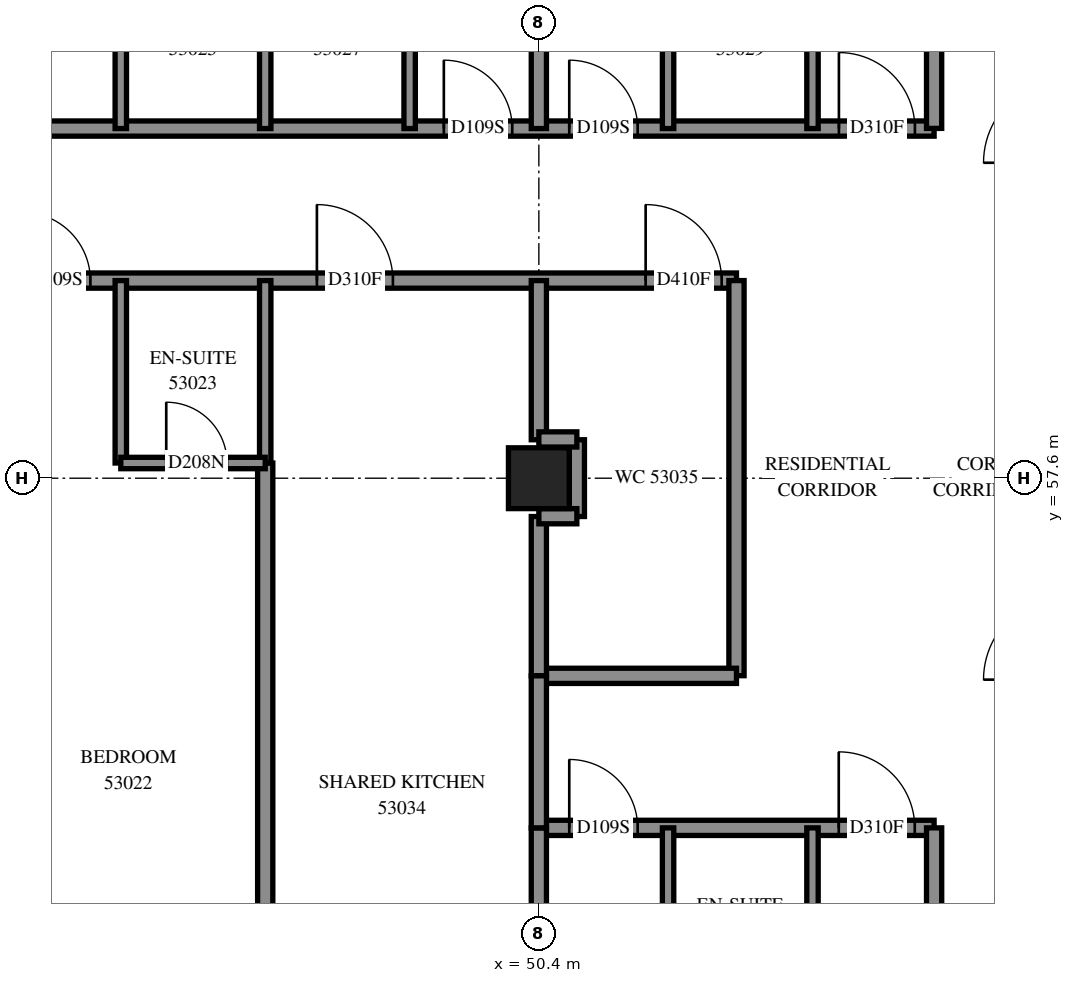
"""IFC4 building model, lengths in metres.
Left out: names, types, materials, properties, quantities, classifications, styles, units other than length and angle.
Written with IfcOpenShell. Run it as: python <this file> out.ifc"""

import sys

from ifc_helpers import new_model, si_unit, direction, frame, frame_2d, origin, origin_2d, place, context, subcontext, project, spatial, rectangle, extrude, element, fill, save


model = new_model("IFC4")
c1 = context("Model", 3, precision=1e-05, world=origin(), true_north=direction((0.0, 1.0)))
c2 = subcontext(c1, "Body", "Model", "MODEL_VIEW")
j1 = project(units=[si_unit("LENGTHUNIT", "METRE"), si_unit("PLANEANGLEUNIT", "RADIAN")], contexts=[c1])
p1 = place(None, origin())
s1 = spatial("IfcSite", under=j1, at=p1, CompositionType="ELEMENT")
p2 = place(p1, origin())
s2 = spatial("IfcBuilding", under=s1, at=p2, CompositionType="ELEMENT")
p3 = place(p2, frame((0.0, 0.0, 196.4)))
s3 = spatial("IfcBuildingStorey", under=s2, at=p3, CompositionType="ELEMENT", Elevation=196.4)
p4 = place(p3, frame((50.4, 57.6, 0.0), z_axis=(0.0, 0.0, 1.0), x_axis=(1.0, 0.0, 0.0)))
e1 = element("IfcColumn", 1, at=p4, inside=s3, PredefinedType="COLUMN", context=c2, shape_type="SweptSolid", body=[
    extrude(rectangle(XDim=0.8, YDim=0.8, at=origin_2d()), origin(), (0.0, 0.0, 1.0), 3.1),
])
p5 = place(p3, frame((36.0, 60.2, 0.0), z_axis=(0.0, 0.0, 1.0), x_axis=(1.0, 0.0, 0.0)))
e2 = element("IfcWall", 2, at=p5, inside=s3, PredefinedType="PARTITIONING", context=c2, shape_type="SweptSolid", body=[
    extrude(rectangle(XDim=17.0, YDim=0.2, at=frame_2d((8.5, 0.0))), origin(), (0.0, 0.0, 1.0), 3.1),
])
p6 = place(p5, frame((4.125, 0.0, 0.0)))
e3 = element("IfcOpeningElement", 3, at=p6, cuts=e2, PredefinedType="OPENING", context=c2, shape_type="SweptSolid", body=[
    extrude(rectangle(XDim=1.0, YDim=2.1, at=frame_2d((0.5, 1.05))), frame((0.0, 0.11, 0.0), z_axis=(0.0, -1.0, 0.0), x_axis=(1.0, 0.0, 0.0)), (0.0, 0.0, 1.0), 0.22),
])
p7 = place(p5, frame((7.6, 0.0, 0.0)))
e4 = element("IfcOpeningElement", 4, at=p7, cuts=e2, PredefinedType="OPENING", context=c2, shape_type="SweptSolid", body=[
    extrude(rectangle(XDim=0.9, YDim=2.1, at=frame_2d((0.45, 1.05))), frame((0.0, 0.11, 0.0), z_axis=(0.0, -1.0, 0.0), x_axis=(1.0, 0.0, 0.0)), (0.0, 0.0, 1.0), 0.22),
])
p8 = place(p5, frame((11.48, 0.0, 0.0)))
e5 = element("IfcOpeningElement", 5, at=p8, cuts=e2, PredefinedType="OPENING", context=c2, shape_type="SweptSolid", body=[
    extrude(rectangle(XDim=1.0, YDim=2.1, at=frame_2d((0.5, 1.05))), frame((0.0, 0.11, 0.0), z_axis=(0.0, -1.0, 0.0), x_axis=(1.0, 0.0, 0.0)), (0.0, 0.0, 1.0), 0.22),
])
p9 = place(p5, frame((15.805, 0.0, 0.0)))
e6 = element("IfcOpeningElement", 6, at=p9, cuts=e2, PredefinedType="OPENING", context=c2, shape_type="SweptSolid", body=[
    extrude(rectangle(XDim=1.0, YDim=2.1, at=frame_2d((0.5, 1.05))), frame((0.0, 0.11, 0.0), z_axis=(0.0, -1.0, 0.0), x_axis=(1.0, 0.0, 0.0)), (0.0, 0.0, 1.0), 0.22),
])
p10 = place(p3, frame((40.602, 62.2, 0.0), z_axis=(0.0, 0.0, 1.0), x_axis=(1.0, 0.0, 0.0)))
e7 = element("IfcWall", 7, at=p10, inside=s3, PredefinedType="PARTITIONING", context=c2, shape_type="SweptSolid", body=[
    extrude(rectangle(XDim=14.998, YDim=0.2, at=frame_2d((7.499, 0.0))), origin(), (0.0, 0.0, 1.0), 3.1),
])
p11 = place(p10, frame((1.306, 0.0, 0.0)))
e8 = element("IfcOpeningElement", 8, at=p11, cuts=e7, PredefinedType="OPENING", context=c2, shape_type="SweptSolid", body=[
    extrude(rectangle(XDim=0.9, YDim=2.1, at=frame_2d((0.45, 1.05))), frame((0.0, 0.11, 0.0), z_axis=(0.0, -1.0, 0.0), x_axis=(1.0, 0.0, 0.0)), (0.0, 0.0, 1.0), 0.22),
])
p12 = place(p10, frame((8.548, 0.0, 0.0)))
e9 = element("IfcOpeningElement", 9, at=p12, cuts=e7, PredefinedType="OPENING", context=c2, shape_type="SweptSolid", body=[
    extrude(rectangle(XDim=0.9, YDim=2.1, at=frame_2d((0.45, 1.05))), frame((0.0, 0.11, 0.0), z_axis=(0.0, -1.0, 0.0), x_axis=(1.0, 0.0, 0.0)), (0.0, 0.0, 1.0), 0.22),
])
p13 = place(p10, frame((10.198, 0.0, 0.0)))
e10 = element("IfcOpeningElement", 10, at=p13, cuts=e7, PredefinedType="OPENING", context=c2, shape_type="SweptSolid", body=[
    extrude(rectangle(XDim=0.9, YDim=2.1, at=frame_2d((0.45, 1.05))), frame((0.0, 0.11, 0.0), z_axis=(0.0, -1.0, 0.0), x_axis=(1.0, 0.0, 0.0)), (0.0, 0.0, 1.0), 0.22),
])
p14 = place(p10, frame((13.746, 0.0, 0.0)))
e11 = element("IfcOpeningElement", 11, at=p14, cuts=e7, PredefinedType="OPENING", context=c2, shape_type="SweptSolid", body=[
    extrude(rectangle(XDim=1.0, YDim=2.1, at=frame_2d((0.5, 1.05))), frame((0.0, 0.11, 0.0), z_axis=(0.0, -1.0, 0.0), x_axis=(1.0, 0.0, 0.0)), (0.0, 0.0, 1.0), 0.22),
])
p15 = place(p3, frame((46.8, 49.7, 0.0), z_axis=(0.0, 0.0, 1.0), x_axis=(0.0, 1.0, 0.0)))
e12 = element("IfcWall", 12, at=p15, inside=s3, PredefinedType="PARTITIONING", context=c2, shape_type="SweptSolid", body=[
    extrude(rectangle(XDim=8.1, YDim=0.2, at=frame_2d((4.05, 0.0))), origin(), (0.0, 0.0, 1.0), 3.1),
])
p16 = place(p3, frame((50.4, 53.0, 0.0), z_axis=(0.0, 0.0, 1.0), x_axis=(1.0, 0.0, 0.0)))
e13 = element("IfcWall", 13, at=p16, inside=s3, PredefinedType="PARTITIONING", context=c2, shape_type="SweptSolid", body=[
    extrude(rectangle(XDim=5.2, YDim=0.2, at=frame_2d((2.6, 0.0))), origin(), (0.0, 0.0, 1.0), 3.1),
])
p17 = place(p16, frame((0.4, 0.0, 0.0)))
e14 = element("IfcOpeningElement", 14, at=p17, cuts=e13, PredefinedType="OPENING", context=c2, shape_type="SweptSolid", body=[
    extrude(rectangle(XDim=0.9, YDim=2.1, at=frame_2d((0.45, 1.05))), frame((0.0, 0.11, 0.0), z_axis=(0.0, -1.0, 0.0), x_axis=(1.0, 0.0, 0.0)), (0.0, 0.0, 1.0), 0.22),
])
p18 = place(p16, frame((3.946, 0.0, 0.0)))
e15 = element("IfcOpeningElement", 15, at=p18, cuts=e13, PredefinedType="OPENING", context=c2, shape_type="SweptSolid", body=[
    extrude(rectangle(XDim=1.0, YDim=2.1, at=frame_2d((0.5, 1.05))), frame((0.0, 0.11, 0.0), z_axis=(0.0, -1.0, 0.0), x_axis=(1.0, 0.0, 0.0)), (0.0, 0.0, 1.0), 0.22),
])
p19 = place(p3, frame((53.0, 55.002, 0.0), z_axis=(0.0, 0.0, 1.0), x_axis=(0.0, 1.0, 0.0)))
e16 = element("IfcWall", 16, at=p19, inside=s3, PredefinedType="PARTITIONING", context=c2, shape_type="SweptSolid", body=[
    extrude(rectangle(XDim=5.198, YDim=0.2, at=frame_2d((2.599, 0.0))), origin(), (0.0, 0.0, 1.0), 3.1),
])
p20 = place(p3, frame((55.6, 48.4, 0.0), z_axis=(0.0, 0.0, 1.0), x_axis=(0.0, 1.0, 0.0)))
e17 = element("IfcWall", 17, at=p20, inside=s3, PredefinedType="PARTITIONING", context=c2, shape_type="SweptSolid", body=[
    extrude(rectangle(XDim=4.6, YDim=0.2, at=frame_2d((2.3, 0.0))), origin(), (0.0, 0.0, 1.0), 3.1),
])
p21 = place(p3, frame((55.6, 62.202, 0.0), z_axis=(0.0, 0.0, 1.0), x_axis=(0.0, 1.0, 0.0)))
e18 = element("IfcWall", 18, at=p21, inside=s3, PredefinedType="PARTITIONING", context=c2, shape_type="SweptSolid", body=[
    extrude(rectangle(XDim=4.598, YDim=0.2, at=frame_2d((2.299, 0.0))), origin(), (0.0, 0.0, 1.0), 3.1),
])
p22 = place(p3, frame((50.4, 55.0, 0.0), z_axis=(0.0, 0.0, 1.0), x_axis=(1.0, 0.0, 0.0)))
e19 = element("IfcWall", 19, at=p22, inside=s3, PredefinedType="PARTITIONING", context=c2, shape_type="SweptSolid", body=[
    extrude(rectangle(XDim=2.6, YDim=0.2, at=frame_2d((1.3, 0.0))), origin(), (0.0, 0.0, 1.0), 3.1),
])
for number, where, z_axis, x_axis in (
    (20, (44.9, 57.8, 0.0), (0.0, 0.0, 1.0), (0.0, 1.0, 0.0)),
    (21, (46.8, 57.8, 0.0), (0.0, 0.0, 1.0), (0.0, 1.0, 0.0)),
    (22, (52.1, 50.6, 0.0), (0.0, 0.0, 1.0), (0.0, 1.0, 0.0)),
    (23, (54.0, 50.6, 0.0), (0.0, 0.0, 1.0), (0.0, 1.0, 0.0)),
    (24, (44.9, 62.2, 0.0), (0.0, 0.0, 1.0), (0.0, 1.0, 0.0)),
    (25, (46.8, 62.2, 0.0), (0.0, 0.0, 1.0), (0.0, 1.0, 0.0)),
    (26, (48.7, 62.2, 0.0), (0.0, 0.0, 1.0), (0.0, 1.0, 0.0)),
    (27, (52.1, 62.2, 0.0), (0.0, 0.0, 1.0), (0.0, 1.0, 0.0)),
    (28, (54.0, 62.2, 0.0), (0.0, 0.0, 1.0), (0.0, 1.0, 0.0)),
):
    element("IfcWall", number, at=place(p3, frame(where, z_axis=z_axis, x_axis=x_axis)), inside=s3, PredefinedType="PARTITIONING", context=c2, shape_type="SweptSolid", body=[
        extrude(rectangle(XDim=2.4, YDim=0.15, at=frame_2d((1.2, 0.0))), origin(), (0.0, 0.0, 1.0), 3.1),
    ])
for number, where, z_axis, x_axis in (
    (29, (50.4, 50.8, 0.0), (0.0, 0.0, 1.0), (0.0, 1.0, 0.0)),
    (30, (50.4, 62.2, 0.0), (0.0, 0.0, 1.0), (0.0, 1.0, 0.0)),
):
    element("IfcWall", number, at=place(p3, frame(where, z_axis=z_axis, x_axis=x_axis)), inside=s3, PredefinedType="PARTITIONING", context=c2, shape_type="SweptSolid", body=[
        extrude(rectangle(XDim=2.2, YDim=0.2, at=frame_2d((1.1, 0.0))), origin(), (0.0, 0.0, 1.0), 3.1),
    ])
p23 = place(p3, frame((50.4, 55.0, 0.0), z_axis=(0.0, 0.0, 1.0), x_axis=(0.0, 1.0, 0.0)))
e31 = element("IfcWall", 31, at=p23, inside=s3, PredefinedType="PARTITIONING", context=c2, shape_type="SweptSolid", body=[
    extrude(rectangle(XDim=2.096, YDim=0.2, at=frame_2d((1.048, 0.0))), origin(), (0.0, 0.0, 1.0), 3.1),
])
p24 = place(p3, frame((50.4, 58.106, 0.0), z_axis=(0.0, 0.0, 1.0), x_axis=(0.0, 1.0, 0.0)))
e32 = element("IfcWall", 32, at=p24, inside=s3, PredefinedType="PARTITIONING", context=c2, shape_type="SweptSolid", body=[
    extrude(rectangle(XDim=2.094, YDim=0.2, at=frame_2d((1.047, 0.0))), origin(), (0.0, 0.0, 1.0), 3.1),
])
p25 = place(p3, frame((50.4, 53.0, 0.0), z_axis=(0.0, 0.0, 1.0), x_axis=(0.0, 1.0, 0.0)))
e33 = element("IfcWall", 33, at=p25, inside=s3, PredefinedType="PARTITIONING", context=c2, shape_type="SweptSolid", body=[
    extrude(rectangle(XDim=2.0, YDim=0.2, at=frame_2d((1.0, 0.0))), origin(), (0.0, 0.0, 1.0), 3.1),
])
p26 = place(p3, frame((44.9, 57.8, 0.0), z_axis=(0.0, 0.0, 1.0), x_axis=(1.0, 0.0, 0.0)))
e34 = element("IfcWall", 34, at=p26, inside=s3, PredefinedType="PARTITIONING", context=c2, shape_type="SweptSolid", body=[
    extrude(rectangle(XDim=1.9, YDim=0.15, at=frame_2d((0.95, 0.0))), origin(), (0.0, 0.0, 1.0), 3.1),
])
p27 = place(p26, frame((0.598, 0.0, 0.0)))
e35 = element("IfcOpeningElement", 35, at=p27, cuts=e34, PredefinedType="OPENING", context=c2, shape_type="SweptSolid", body=[
    extrude(rectangle(XDim=0.8, YDim=2.1, at=frame_2d((0.4, 1.05))), frame((0.0, 0.085, 0.0), z_axis=(0.0, -1.0, 0.0), x_axis=(1.0, 0.0, 0.0)), (0.0, 0.0, 1.0), 0.17),
])
p28 = place(p3, frame((50.9, 57.096, 0.0), z_axis=(0.0, 0.0, 1.0), x_axis=(0.0, 1.0, 0.0)))
e36 = element("IfcWall", 36, at=p28, inside=s3, PredefinedType="PARTITIONING", context=c2, shape_type="SweptSolid", body=[
    extrude(rectangle(XDim=1.01, YDim=0.2, at=frame_2d((0.505, 0.0))), origin(), (0.0, 0.0, 1.0), 3.1),
])
for number, where, z_axis, x_axis in (
    (37, (50.4, 58.11, 0.0), (0.0, 0.0, 1.0), (1.0, 0.0, 0.0)),
    (38, (50.4, 57.1, 0.0), (0.0, 0.0, 1.0), (1.0, 0.0, 0.0)),
):
    element("IfcWall", number, at=place(p3, frame(where, z_axis=z_axis, x_axis=x_axis)), inside=s3, PredefinedType="PARTITIONING", context=c2, shape_type="SweptSolid", body=[
        extrude(rectangle(XDim=0.5, YDim=0.2, at=frame_2d((0.25, 0.0))), origin(), (0.0, 0.0, 1.0), 3.1),
    ])
p29 = place(p7, origin())
e39 = element("IfcDoor", 39, at=p29, inside=s3, OperationType="SINGLE_SWING_LEFT", PredefinedType="DOOR", context=c2, shape_type="SweptSolid", body=[
    extrude(rectangle(XDim=0.9, YDim=2.1, at=frame_2d((0.45, 1.05))), frame((0.0, 0.025, 0.0), z_axis=(0.0, -1.0, 0.0), x_axis=(1.0, 0.0, 0.0)), (0.0, 0.0, 1.0), 0.05),
])
fill(e4, e39)
p30 = place(p27, origin())
e40 = element("IfcDoor", 40, at=p30, inside=s3, OperationType="SINGLE_SWING_RIGHT", PredefinedType="DOOR", context=c2, shape_type="SweptSolid", body=[
    extrude(rectangle(XDim=0.8, YDim=2.1, at=frame_2d((0.4, 1.05))), frame((0.0, 0.025, 0.0), z_axis=(0.0, -1.0, 0.0), x_axis=(1.0, 0.0, 0.0)), (0.0, 0.0, 1.0), 0.05),
])
fill(e35, e40)
p31 = place(p12, origin())
e41 = element("IfcDoor", 41, at=p31, inside=s3, OperationType="SINGLE_SWING_LEFT", PredefinedType="DOOR", context=c2, shape_type="SweptSolid", body=[
    extrude(rectangle(XDim=0.9, YDim=2.1, at=frame_2d((0.45, 1.05))), frame((0.0, 0.025, 0.0), z_axis=(0.0, -1.0, 0.0), x_axis=(1.0, 0.0, 0.0)), (0.0, 0.0, 1.0), 0.05),
])
fill(e9, e41)
p32 = place(p13, origin())
e42 = element("IfcDoor", 42, at=p32, inside=s3, OperationType="SINGLE_SWING_RIGHT", PredefinedType="DOOR", context=c2, shape_type="SweptSolid", body=[
    extrude(rectangle(XDim=0.9, YDim=2.1, at=frame_2d((0.45, 1.05))), frame((0.0, 0.025, 0.0), z_axis=(0.0, -1.0, 0.0), x_axis=(1.0, 0.0, 0.0)), (0.0, 0.0, 1.0), 0.05),
])
fill(e10, e42)
p33 = place(p14, origin())
e43 = element("IfcDoor", 43, at=p33, inside=s3, OperationType="SINGLE_SWING_LEFT", PredefinedType="DOOR", context=c2, shape_type="SweptSolid", body=[
    extrude(rectangle(XDim=1.0, YDim=2.1, at=frame_2d((0.5, 1.05))), frame((0.0, 0.025, 0.0), z_axis=(0.0, -1.0, 0.0), x_axis=(1.0, 0.0, 0.0)), (0.0, 0.0, 1.0), 0.05),
])
fill(e11, e43)
p34 = place(p8, origin())
e44 = element("IfcDoor", 44, at=p34, inside=s3, OperationType="SINGLE_SWING_RIGHT", PredefinedType="DOOR", context=c2, shape_type="SweptSolid", body=[
    extrude(rectangle(XDim=1.0, YDim=2.1, at=frame_2d((0.5, 1.05))), frame((0.0, 0.025, 0.0), z_axis=(0.0, -1.0, 0.0), x_axis=(1.0, 0.0, 0.0)), (0.0, 0.0, 1.0), 0.05),
])
fill(e5, e44)
p35 = place(p9, origin())
e45 = element("IfcDoor", 45, at=p35, inside=s3, OperationType="SINGLE_SWING_LEFT", PredefinedType="DOOR", context=c2, shape_type="SweptSolid", body=[
    extrude(rectangle(XDim=1.0, YDim=2.1, at=frame_2d((0.5, 1.05))), frame((0.0, 0.025, 0.0), z_axis=(0.0, -1.0, 0.0), x_axis=(1.0, 0.0, 0.0)), (0.0, 0.0, 1.0), 0.05),
])
fill(e6, e45)
p36 = place(p17, origin())
e46 = element("IfcDoor", 46, at=p36, inside=s3, OperationType="SINGLE_SWING_LEFT", PredefinedType="DOOR", context=c2, shape_type="SweptSolid", body=[
    extrude(rectangle(XDim=0.9, YDim=2.1, at=frame_2d((0.45, 1.05))), frame((0.0, 0.025, 0.0), z_axis=(0.0, -1.0, 0.0), x_axis=(1.0, 0.0, 0.0)), (0.0, 0.0, 1.0), 0.05),
])
fill(e14, e46)
p37 = place(p18, origin())
e47 = element("IfcDoor", 47, at=p37, inside=s3, OperationType="SINGLE_SWING_RIGHT", PredefinedType="DOOR", context=c2, shape_type="SweptSolid", body=[
    extrude(rectangle(XDim=1.0, YDim=2.1, at=frame_2d((0.5, 1.05))), frame((0.0, 0.025, 0.0), z_axis=(0.0, -1.0, 0.0), x_axis=(1.0, 0.0, 0.0)), (0.0, 0.0, 1.0), 0.05),
])
fill(e15, e47)
save(model, sys.argv[1])
